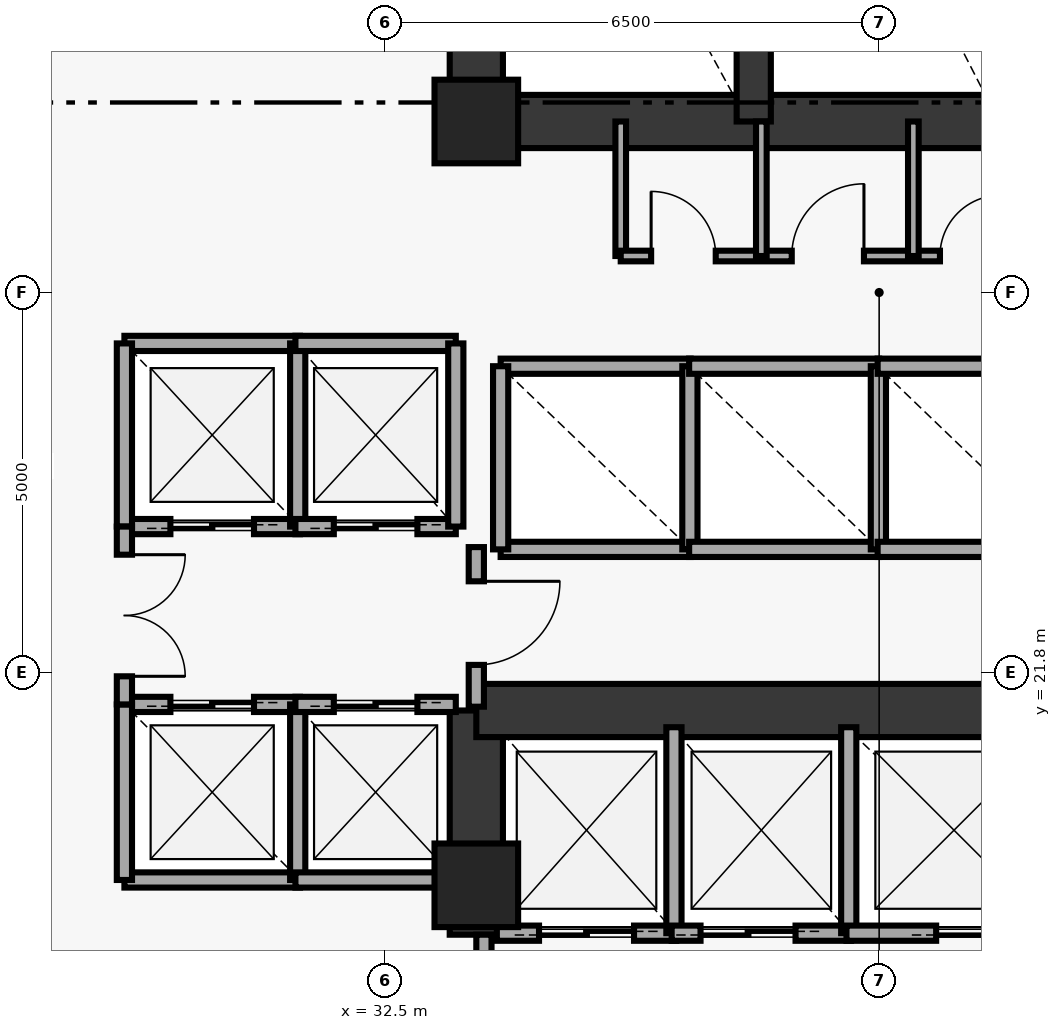
"""IFC4 building model, lengths in metres.
Left out: names, types, materials, properties, quantities, classifications, styles, units other than length and angle.
Written with IfcOpenShell. Run it as: python <this file> out.ifc"""

import sys

from ifc_helpers import new_model, si_unit, direction, frame, frame_2d, origin, origin_2d, place, context, subcontext, project, spatial, rectangle, extrude, element, fill, save


model = new_model("IFC4")
c1 = context("Model", 3, precision=1e-05, world=origin(), true_north=direction((0.0, 1.0)))
c2 = subcontext(c1, "Body", "Model", "MODEL_VIEW")
j1 = project(units=[si_unit("LENGTHUNIT", "METRE"), si_unit("PLANEANGLEUNIT", "RADIAN")], contexts=[c1])
p1 = place(None, origin())
s1 = spatial("IfcSite", under=j1, at=p1, CompositionType="ELEMENT")
p2 = place(p1, origin())
s2 = spatial("IfcBuilding", under=s1, at=p2, CompositionType="ELEMENT")
p3 = place(p2, frame((0.0, 0.0, 102.0)))
s3 = spatial("IfcBuildingStorey", under=s2, at=p3, CompositionType="ELEMENT", Elevation=102.0)
for number, where, z_axis, x_axis in (
    (1, (33.7, 19.0, 0.0), (0.0, 0.0, 1.0), (1.0, 0.0, 0.0)),
    (2, (33.7, 29.05, 0.0), (0.0, 0.0, 1.0), (1.0, 0.0, 0.0)),
):
    element("IfcColumn", number, at=place(p3, frame(where, z_axis=z_axis, x_axis=x_axis)), inside=s3, PredefinedType="PILASTER", context=c2, shape_type="SweptSolid", body=[
        extrude(rectangle(XDim=1.1, YDim=1.1, at=origin_2d()), origin(), (0.0, 0.0, 1.0), 3.7),
    ])
p4 = place(p3, frame((33.7, 29.05, 0.0), z_axis=(0.0, 0.0, 1.0), x_axis=(0.0, 1.0, 0.0)))
e3 = element("IfcWall", 3, at=p4, inside=s3, PredefinedType="SHEAR", context=c2, shape_type="SweptSolid", body=[
    extrude(rectangle(XDim=8.35, YDim=0.7, at=frame_2d((4.175, 0.0))), origin(), (0.0, 0.0, 1.0), 3.7),
])
p5 = place(p3, frame((33.7, 18.35, 0.0), z_axis=(0.0, 0.0, 1.0), x_axis=(0.0, 1.0, 0.0)))
e4 = element("IfcWall", 4, at=p5, inside=s3, PredefinedType="SHEAR", context=c2, shape_type="SweptSolid", body=[
    extrude(rectangle(XDim=2.95, YDim=0.7, at=frame_2d((1.475, 0.0))), origin(), (0.0, 0.0, 1.0), 3.7),
])
p6 = place(p3, frame((33.7, 29.05, 0.0), z_axis=(0.0, 0.0, 1.0), x_axis=(1.0, 0.0, 0.0)))
e5 = element("IfcWall", 5, at=p6, inside=s3, PredefinedType="SHEAR", context=c2, shape_type="SweptSolid", body=[
    extrude(rectangle(XDim=10.6, YDim=0.7, at=frame_2d((5.3, 0.0))), origin(), (0.0, 0.0, 1.0), 3.7),
])
p7 = place(p3, frame((33.7, 21.3, 0.0), z_axis=(0.0, 0.0, 1.0), x_axis=(1.0, 0.0, 0.0)))
e6 = element("IfcWall", 6, at=p7, inside=s3, PredefinedType="SHEAR", context=c2, shape_type="SweptSolid", body=[
    extrude(rectangle(XDim=7.55, YDim=0.7, at=frame_2d((3.775, 0.0))), origin(), (0.0, 0.0, 1.0), 3.7),
])
p8 = place(p3, frame((37.35, 29.05, 0.0), z_axis=(0.0, 0.0, 1.0), x_axis=(0.0, 1.0, 0.0)))
e7 = element("IfcWall", 7, at=p8, inside=s3, PredefinedType="SHEAR", context=c2, shape_type="SweptSolid", body=[
    extrude(rectangle(XDim=8.35, YDim=0.45, at=frame_2d((4.175, 0.0))), origin(), (0.0, 0.0, 1.0), 3.7),
])
p9 = place(p3, frame((35.6, 27.28, 0.0), z_axis=(0.0, 0.0, 1.0), x_axis=(0.0, 1.0, 0.0)))
e8 = element("IfcWall", 8, at=p9, inside=s3, PredefinedType="PARTITIONING", context=c2, shape_type="SweptSolid", body=[
    extrude(rectangle(XDim=1.77, YDim=0.14, at=frame_2d((0.885, 0.0))), origin(), (0.0, 0.0, 1.0), 3.7),
])
p10 = place(p3, frame((29.07, 23.72, 0.0), z_axis=(0.0, 0.0, 1.0), x_axis=(1.0, 0.0, 0.0)))
e9 = element("IfcWall", 9, at=p10, inside=s3, PredefinedType="SOLIDWALL", context=c2, shape_type="SweptSolid", body=[
    extrude(rectangle(XDim=2.31, YDim=0.2, at=frame_2d((1.155, 0.0))), origin(), (0.0, 0.0, 1.0), 3.7),
])
p11 = place(p10, frame((0.605, 0.0, 0.0)))
e10 = element("IfcOpeningElement", 10, at=p11, cuts=e9, PredefinedType="OPENING", context=c2, shape_type="SweptSolid", body=[
    extrude(rectangle(XDim=1.1, YDim=2.15, at=frame_2d((0.55, 1.075))), frame((0.0, 0.11, 0.0), z_axis=(0.0, -1.0, 0.0), x_axis=(1.0, 0.0, 0.0)), (0.0, 0.0, 1.0), 0.22),
])
p12 = place(p3, frame((29.07, 26.13, 0.0), z_axis=(0.0, 0.0, 1.0), x_axis=(1.0, 0.0, 0.0)))
e11 = element("IfcWall", 11, at=p12, inside=s3, PredefinedType="SOLIDWALL", context=c2, shape_type="SweptSolid", body=[
    extrude(rectangle(XDim=2.31, YDim=0.2, at=frame_2d((1.155, 0.0))), origin(), (0.0, 0.0, 1.0), 3.7),
])
for number, where, z_axis, x_axis in (
    (12, (29.07, 23.72, 0.0), (0.0, 0.0, 1.0), (0.0, 1.0, 0.0)),
    (13, (31.35, 23.72, 0.0), (0.0, 0.0, 1.0), (0.0, 1.0, 0.0)),
):
    element("IfcWall", number, at=place(p3, frame(where, z_axis=z_axis, x_axis=x_axis)), inside=s3, PredefinedType="SOLIDWALL", context=c2, shape_type="SweptSolid", body=[
        extrude(rectangle(XDim=2.41, YDim=0.2, at=frame_2d((1.205, 0.0))), origin(), (0.0, 0.0, 1.0), 3.7),
    ])
p13 = place(p3, frame((31.32, 23.72, 0.0), z_axis=(0.0, 0.0, 1.0), x_axis=(1.0, 0.0, 0.0)))
e14 = element("IfcWall", 14, at=p13, inside=s3, PredefinedType="SOLIDWALL", context=c2, shape_type="SweptSolid", body=[
    extrude(rectangle(XDim=2.11, YDim=0.2, at=frame_2d((1.055, 0.0))), origin(), (0.0, 0.0, 1.0), 3.7),
])
p14 = place(p13, frame((0.505, 0.0, 0.0)))
e15 = element("IfcOpeningElement", 15, at=p14, cuts=e14, PredefinedType="OPENING", context=c2, shape_type="SweptSolid", body=[
    extrude(rectangle(XDim=1.1, YDim=2.15, at=frame_2d((0.55, 1.075))), frame((0.0, 0.11, 0.0), z_axis=(0.0, -1.0, 0.0), x_axis=(1.0, 0.0, 0.0)), (0.0, 0.0, 1.0), 0.22),
])
p15 = place(p3, frame((31.32, 26.13, 0.0), z_axis=(0.0, 0.0, 1.0), x_axis=(1.0, 0.0, 0.0)))
e16 = element("IfcWall", 16, at=p15, inside=s3, PredefinedType="SOLIDWALL", context=c2, shape_type="SweptSolid", body=[
    extrude(rectangle(XDim=2.11, YDim=0.2, at=frame_2d((1.055, 0.0))), origin(), (0.0, 0.0, 1.0), 3.7),
])
p16 = place(p3, frame((33.43, 23.72, 0.0), z_axis=(0.0, 0.0, 1.0), x_axis=(0.0, 1.0, 0.0)))
e17 = element("IfcWall", 17, at=p16, inside=s3, PredefinedType="SOLIDWALL", context=c2, shape_type="SweptSolid", body=[
    extrude(rectangle(XDim=2.41, YDim=0.2, at=frame_2d((1.205, 0.0))), origin(), (0.0, 0.0, 1.0), 3.7),
])
p17 = place(p3, frame((29.07, 19.07, 0.0), z_axis=(0.0, 0.0, 1.0), x_axis=(1.0, 0.0, 0.0)))
e18 = element("IfcWall", 18, at=p17, inside=s3, PredefinedType="SOLIDWALL", context=c2, shape_type="SweptSolid", body=[
    extrude(rectangle(XDim=2.31, YDim=0.2, at=frame_2d((1.155, 0.0))), origin(), (0.0, 0.0, 1.0), 3.7),
])
p18 = place(p3, frame((29.07, 21.38, 0.0), z_axis=(0.0, 0.0, 1.0), x_axis=(1.0, 0.0, 0.0)))
e19 = element("IfcWall", 19, at=p18, inside=s3, PredefinedType="SOLIDWALL", context=c2, shape_type="SweptSolid", body=[
    extrude(rectangle(XDim=2.31, YDim=0.2, at=frame_2d((1.155, 0.0))), origin(), (0.0, 0.0, 1.0), 3.7),
])
p19 = place(p18, frame((0.605, 0.0, 0.0)))
e20 = element("IfcOpeningElement", 20, at=p19, cuts=e19, PredefinedType="OPENING", context=c2, shape_type="SweptSolid", body=[
    extrude(rectangle(XDim=1.1, YDim=2.15, at=frame_2d((0.55, 1.075))), frame((0.0, 0.11, 0.0), z_axis=(0.0, -1.0, 0.0), x_axis=(1.0, 0.0, 0.0)), (0.0, 0.0, 1.0), 0.22),
])
for number, where, z_axis, x_axis in (
    (21, (29.07, 19.07, 0.0), (0.0, 0.0, 1.0), (0.0, 1.0, 0.0)),
    (22, (31.35, 19.07, 0.0), (0.0, 0.0, 1.0), (0.0, 1.0, 0.0)),
):
    element("IfcWall", number, at=place(p3, frame(where, z_axis=z_axis, x_axis=x_axis)), inside=s3, PredefinedType="SOLIDWALL", context=c2, shape_type="SweptSolid", body=[
        extrude(rectangle(XDim=2.31, YDim=0.2, at=frame_2d((1.155, 0.0))), origin(), (0.0, 0.0, 1.0), 3.7),
    ])
p20 = place(p3, frame((31.32, 19.07, 0.0), z_axis=(0.0, 0.0, 1.0), x_axis=(1.0, 0.0, 0.0)))
e23 = element("IfcWall", 23, at=p20, inside=s3, PredefinedType="SOLIDWALL", context=c2, shape_type="SweptSolid", body=[
    extrude(rectangle(XDim=2.11, YDim=0.2, at=frame_2d((1.055, 0.0))), origin(), (0.0, 0.0, 1.0), 3.7),
])
p21 = place(p3, frame((31.32, 21.38, 0.0), z_axis=(0.0, 0.0, 1.0), x_axis=(1.0, 0.0, 0.0)))
e24 = element("IfcWall", 24, at=p21, inside=s3, PredefinedType="SOLIDWALL", context=c2, shape_type="SweptSolid", body=[
    extrude(rectangle(XDim=2.11, YDim=0.2, at=frame_2d((1.055, 0.0))), origin(), (0.0, 0.0, 1.0), 3.7),
])
p22 = place(p21, frame((0.505, 0.0, 0.0)))
e25 = element("IfcOpeningElement", 25, at=p22, cuts=e24, PredefinedType="OPENING", context=c2, shape_type="SweptSolid", body=[
    extrude(rectangle(XDim=1.1, YDim=2.15, at=frame_2d((0.55, 1.075))), frame((0.0, 0.11, 0.0), z_axis=(0.0, -1.0, 0.0), x_axis=(1.0, 0.0, 0.0)), (0.0, 0.0, 1.0), 0.22),
])
for number, where, z_axis, x_axis in (
    (26, (34.02, 23.42, 0.0), (0.0, 0.0, 1.0), (1.0, 0.0, 0.0)),
    (27, (34.02, 25.83, 0.0), (0.0, 0.0, 1.0), (1.0, 0.0, 0.0)),
):
    element("IfcWall", number, at=place(p3, frame(where, z_axis=z_axis, x_axis=x_axis)), inside=s3, PredefinedType="SOLIDWALL", context=c2, shape_type="SweptSolid", body=[
        extrude(rectangle(XDim=2.5, YDim=0.2, at=frame_2d((1.25, 0.0))), origin(), (0.0, 0.0, 1.0), 3.7),
    ])
for number, where, z_axis, x_axis in (
    (28, (34.02, 23.42, 0.0), (0.0, 0.0, 1.0), (0.0, 1.0, 0.0)),
    (29, (36.51, 23.42, 0.0), (0.0, 0.0, 1.0), (0.0, 1.0, 0.0)),
):
    element("IfcWall", number, at=place(p3, frame(where, z_axis=z_axis, x_axis=x_axis)), inside=s3, PredefinedType="SOLIDWALL", context=c2, shape_type="SweptSolid", body=[
        extrude(rectangle(XDim=2.41, YDim=0.2, at=frame_2d((1.205, 0.0))), origin(), (0.0, 0.0, 1.0), 3.7),
    ])
for number, where, z_axis, x_axis in (
    (30, (36.5, 23.42, 0.0), (0.0, 0.0, 1.0), (1.0, 0.0, 0.0)),
    (31, (36.5, 25.83, 0.0), (0.0, 0.0, 1.0), (1.0, 0.0, 0.0)),
):
    element("IfcWall", number, at=place(p3, frame(where, z_axis=z_axis, x_axis=x_axis)), inside=s3, PredefinedType="SOLIDWALL", context=c2, shape_type="SweptSolid", body=[
        extrude(rectangle(XDim=2.5, YDim=0.2, at=frame_2d((1.25, 0.0))), origin(), (0.0, 0.0, 1.0), 3.7),
    ])
p23 = place(p3, frame((38.99, 23.42, 0.0), z_axis=(0.0, 0.0, 1.0), x_axis=(0.0, 1.0, 0.0)))
e32 = element("IfcWall", 32, at=p23, inside=s3, PredefinedType="SOLIDWALL", context=c2, shape_type="SweptSolid", body=[
    extrude(rectangle(XDim=2.41, YDim=0.2, at=frame_2d((1.205, 0.0))), origin(), (0.0, 0.0, 1.0), 3.7),
])
for number, where, z_axis, x_axis in (
    (33, (38.98, 23.42, 0.0), (0.0, 0.0, 1.0), (1.0, 0.0, 0.0)),
    (34, (38.98, 25.83, 0.0), (0.0, 0.0, 1.0), (1.0, 0.0, 0.0)),
):
    element("IfcWall", number, at=place(p3, frame(where, z_axis=z_axis, x_axis=x_axis)), inside=s3, PredefinedType="SOLIDWALL", context=c2, shape_type="SweptSolid", body=[
        extrude(rectangle(XDim=2.5, YDim=0.2, at=frame_2d((1.25, 0.0))), origin(), (0.0, 0.0, 1.0), 3.7),
    ])
p24 = place(p3, frame((33.97, 18.37, 0.0), z_axis=(0.0, 0.0, 1.0), x_axis=(1.0, 0.0, 0.0)))
e35 = element("IfcWall", 35, at=p24, inside=s3, PredefinedType="SOLIDWALL", context=c2, shape_type="SweptSolid", body=[
    extrude(rectangle(XDim=2.36, YDim=0.2, at=frame_2d((1.18, 0.0))), origin(), (0.0, 0.0, 1.0), 3.7),
])
p25 = place(p24, frame((0.555, 0.0, 0.0)))
e36 = element("IfcOpeningElement", 36, at=p25, cuts=e35, PredefinedType="OPENING", context=c2, shape_type="SweptSolid", body=[
    extrude(rectangle(XDim=1.25, YDim=2.2, at=frame_2d((0.625, 1.1))), frame((0.0, 0.11, 0.0), z_axis=(0.0, -1.0, 0.0), x_axis=(1.0, 0.0, 0.0)), (0.0, 0.0, 1.0), 0.22),
])
p26 = place(p3, frame((36.3, 18.37, 0.0), z_axis=(0.0, 0.0, 1.0), x_axis=(0.0, 1.0, 0.0)))
e37 = element("IfcWall", 37, at=p26, inside=s3, PredefinedType="SOLIDWALL", context=c2, shape_type="SweptSolid", body=[
    extrude(rectangle(XDim=2.71, YDim=0.2, at=frame_2d((1.355, 0.0))), origin(), (0.0, 0.0, 1.0), 3.7),
])
p27 = place(p3, frame((36.27, 18.37, 0.0), z_axis=(0.0, 0.0, 1.0), x_axis=(1.0, 0.0, 0.0)))
e38 = element("IfcWall", 38, at=p27, inside=s3, PredefinedType="SOLIDWALL", context=c2, shape_type="SweptSolid", body=[
    extrude(rectangle(XDim=2.36, YDim=0.2, at=frame_2d((1.18, 0.0))), origin(), (0.0, 0.0, 1.0), 3.7),
])
p28 = place(p27, frame((0.38, 0.0, 0.0)))
e39 = element("IfcOpeningElement", 39, at=p28, cuts=e38, PredefinedType="OPENING", context=c2, shape_type="SweptSolid", body=[
    extrude(rectangle(XDim=1.25, YDim=2.2, at=frame_2d((0.625, 1.1))), frame((0.0, 0.11, 0.0), z_axis=(0.0, -1.0, 0.0), x_axis=(1.0, 0.0, 0.0)), (0.0, 0.0, 1.0), 0.22),
])
p29 = place(p3, frame((38.6, 18.37, 0.0), z_axis=(0.0, 0.0, 1.0), x_axis=(0.0, 1.0, 0.0)))
e40 = element("IfcWall", 40, at=p29, inside=s3, PredefinedType="SOLIDWALL", context=c2, shape_type="SweptSolid", body=[
    extrude(rectangle(XDim=2.71, YDim=0.2, at=frame_2d((1.355, 0.0))), origin(), (0.0, 0.0, 1.0), 3.7),
])
p30 = place(p3, frame((38.57, 18.37, 0.0), z_axis=(0.0, 0.0, 1.0), x_axis=(1.0, 0.0, 0.0)))
e41 = element("IfcWall", 41, at=p30, inside=s3, PredefinedType="SOLIDWALL", context=c2, shape_type="SweptSolid", body=[
    extrude(rectangle(XDim=2.83, YDim=0.2, at=frame_2d((1.415, 0.0))), origin(), (0.0, 0.0, 1.0), 3.7),
])
p31 = place(p30, frame((1.18, 0.0, 0.0)))
e42 = element("IfcOpeningElement", 42, at=p31, cuts=e41, PredefinedType="OPENING", context=c2, shape_type="SweptSolid", body=[
    extrude(rectangle(XDim=1.35, YDim=2.18, at=frame_2d((0.675, 1.09))), frame((0.0, 0.11, 0.0), z_axis=(0.0, -1.0, 0.0), x_axis=(1.0, 0.0, 0.0)), (0.0, 0.0, 1.0), 0.22),
])
p32 = place(p3, frame((29.07, 21.38, 0.0), z_axis=(0.0, 0.0, 1.0), x_axis=(0.0, 1.0, 0.0)))
e43 = element("IfcWall", 43, at=p32, inside=s3, PredefinedType="SOLIDWALL", context=c2, shape_type="SweptSolid", body=[
    extrude(rectangle(XDim=2.34, YDim=0.2, at=frame_2d((1.17, 0.0))), origin(), (0.0, 0.0, 1.0), 3.7),
])
p33 = place(p32, frame((0.37, 0.0, 0.0)))
e44 = element("IfcOpeningElement", 44, at=p33, cuts=e43, PredefinedType="OPENING", context=c2, shape_type="SweptSolid", body=[
    extrude(rectangle(XDim=1.6, YDim=2.2, at=frame_2d((0.8, 1.1))), frame((0.0, 0.11, 0.0), z_axis=(0.0, -1.0, 0.0), x_axis=(1.0, 0.0, 0.0)), (0.0, 0.0, 1.0), 0.22),
])
p34 = place(p3, frame((33.7, 21.35, 0.0), z_axis=(0.0, 0.0, 1.0), x_axis=(0.0, 1.0, 0.0)))
e45 = element("IfcWall", 45, at=p34, inside=s3, PredefinedType="SOLIDWALL", context=c2, shape_type="SweptSolid", body=[
    extrude(rectangle(XDim=2.1, YDim=0.2, at=frame_2d((1.05, 0.0))), origin(), (0.0, 0.0, 1.0), 2.92),
])
p35 = place(p34, frame((0.55, 0.0, 0.0)))
e46 = element("IfcOpeningElement", 46, at=p35, cuts=e45, PredefinedType="OPENING", context=c2, shape_type="SweptSolid", body=[
    extrude(rectangle(XDim=1.1, YDim=2.15, at=frame_2d((0.55, 1.075))), frame((0.0, 0.11, 0.0), z_axis=(0.0, -1.0, 0.0), x_axis=(1.0, 0.0, 0.0)), (0.0, 0.0, 1.0), 0.22),
])
p36 = place(p3, frame((33.8, 15.55, 0.0), z_axis=(0.0, 0.0, 1.0), x_axis=(0.0, 1.0, 0.0)))
e47 = element("IfcWall", 47, at=p36, inside=s3, PredefinedType="SOLIDWALL", context=c2, shape_type="SweptSolid", body=[
    extrude(rectangle(XDim=2.8, YDim=0.2, at=frame_2d((1.4, 0.0))), origin(), (0.0, 0.0, 1.0), 3.7),
])
p37 = place(p3, frame((35.6, 27.28, 0.0), z_axis=(0.0, 0.0, 1.0), x_axis=(1.0, 0.0, 0.0)))
e48 = element("IfcWall", 48, at=p37, inside=s3, PredefinedType="PARTITIONING", context=c2, shape_type="SweptSolid", body=[
    extrude(rectangle(XDim=5.4, YDim=0.14, at=frame_2d((2.7, 0.0))), origin(), (0.0, 0.0, 1.0), 3.7),
])
p38 = place(p37, frame((0.4, 0.0, 0.0)))
e49 = element("IfcOpeningElement", 49, at=p38, cuts=e48, PredefinedType="OPENING", context=c2, shape_type="SweptSolid", body=[
    extrude(rectangle(XDim=0.85, YDim=2.1, at=frame_2d((0.425, 1.05))), frame((0.0, 0.08, 0.0), z_axis=(0.0, -1.0, 0.0), x_axis=(1.0, 0.0, 0.0)), (0.0, 0.0, 1.0), 0.16),
])
p39 = place(p37, frame((2.25, 0.0, 0.0)))
e50 = element("IfcOpeningElement", 50, at=p39, cuts=e48, PredefinedType="OPENING", context=c2, shape_type="SweptSolid", body=[
    extrude(rectangle(XDim=0.95, YDim=2.1, at=frame_2d((0.475, 1.05))), frame((0.0, 0.08, 0.0), z_axis=(0.0, -1.0, 0.0), x_axis=(1.0, 0.0, 0.0)), (0.0, 0.0, 1.0), 0.16),
])
p40 = place(p37, frame((4.2, 0.0, 0.0)))
e51 = element("IfcOpeningElement", 51, at=p40, cuts=e48, PredefinedType="OPENING", context=c2, shape_type="SweptSolid", body=[
    extrude(rectangle(XDim=0.8, YDim=2.05, at=frame_2d((0.4, 1.025))), frame((0.0, 0.08, 0.0), z_axis=(0.0, -1.0, 0.0), x_axis=(1.0, 0.0, 0.0)), (0.0, 0.0, 1.0), 0.16),
])
for number, where, z_axis, x_axis in (
    (52, (37.45, 27.28, 0.0), (0.0, 0.0, 1.0), (0.0, 1.0, 0.0)),
    (53, (39.45, 27.28, 0.0), (0.0, 0.0, 1.0), (0.0, 1.0, 0.0)),
):
    element("IfcWall", number, at=place(p3, frame(where, z_axis=z_axis, x_axis=x_axis)), inside=s3, PredefinedType="PARTITIONING", context=c2, shape_type="SweptSolid", body=[
        extrude(rectangle(XDim=1.77, YDim=0.14, at=frame_2d((0.885, 0.0))), origin(), (0.0, 0.0, 1.0), 3.7),
    ])
p41 = place(p3, frame((28.492, 14.822, 0.0), z_axis=(0.0, 0.0, 1.0), x_axis=(-0.558319056182, 0.829626320402, 0.0)))
e54 = element("IfcWall", 54, at=p41, inside=s3, PredefinedType="PARTITIONING", context=c2, shape_type="SweptSolid", body=[
    extrude(rectangle(XDim=4.229, YDim=0.16, at=frame_2d((2.114, 0.0))), origin(), (0.0, 0.0, 1.0), 3.7),
])
p42 = place(p41, frame((1.639, 0.0, 0.0)))
e55 = element("IfcOpeningElement", 55, at=p42, cuts=e54, PredefinedType="OPENING", context=c2, shape_type="SweptSolid", body=[
    extrude(rectangle(XDim=0.95, YDim=2.15, at=frame_2d((0.475, 1.075))), frame((0.0, 0.09, 0.0), z_axis=(0.0, -1.0, 0.0), x_axis=(1.0, 0.0, 0.0)), (0.0, 0.0, 1.0), 0.18),
])
p43 = place(p11, origin())
e56 = element("IfcDoor", 56, at=p43, inside=s3, OperationType="DOUBLE_DOOR_SLIDING", PredefinedType="DOOR", context=c2, shape_type="SweptSolid", body=[
    extrude(rectangle(XDim=1.1, YDim=2.15, at=frame_2d((0.55, 1.075))), frame((0.0, 0.025, 0.0), z_axis=(0.0, -1.0, 0.0), x_axis=(1.0, 0.0, 0.0)), (0.0, 0.0, 1.0), 0.05),
])
fill(e10, e56)
p44 = place(p14, origin())
e57 = element("IfcDoor", 57, at=p44, inside=s3, OperationType="DOUBLE_DOOR_SLIDING", PredefinedType="DOOR", context=c2, shape_type="SweptSolid", body=[
    extrude(rectangle(XDim=1.1, YDim=2.15, at=frame_2d((0.55, 1.075))), frame((0.0, 0.025, 0.0), z_axis=(0.0, -1.0, 0.0), x_axis=(1.0, 0.0, 0.0)), (0.0, 0.0, 1.0), 0.05),
])
fill(e15, e57)
p45 = place(p19, origin())
e58 = element("IfcDoor", 58, at=p45, inside=s3, OperationType="DOUBLE_DOOR_SLIDING", PredefinedType="DOOR", context=c2, shape_type="SweptSolid", body=[
    extrude(rectangle(XDim=1.1, YDim=2.15, at=frame_2d((0.55, 1.075))), frame((0.0, 0.025, 0.0), z_axis=(0.0, -1.0, 0.0), x_axis=(1.0, 0.0, 0.0)), (0.0, 0.0, 1.0), 0.05),
])
fill(e20, e58)
p46 = place(p22, origin())
e59 = element("IfcDoor", 59, at=p46, inside=s3, OperationType="DOUBLE_DOOR_SLIDING", PredefinedType="DOOR", context=c2, shape_type="SweptSolid", body=[
    extrude(rectangle(XDim=1.1, YDim=2.15, at=frame_2d((0.55, 1.075))), frame((0.0, 0.025, 0.0), z_axis=(0.0, -1.0, 0.0), x_axis=(1.0, 0.0, 0.0)), (0.0, 0.0, 1.0), 0.05),
])
fill(e25, e59)
p47 = place(p25, origin())
e60 = element("IfcDoor", 60, at=p47, inside=s3, OperationType="DOUBLE_DOOR_SLIDING", PredefinedType="DOOR", context=c2, shape_type="SweptSolid", body=[
    extrude(rectangle(XDim=1.25, YDim=2.2, at=frame_2d((0.625, 1.1))), frame((0.0, 0.025, 0.0), z_axis=(0.0, -1.0, 0.0), x_axis=(1.0, 0.0, 0.0)), (0.0, 0.0, 1.0), 0.05),
])
fill(e36, e60)
p48 = place(p28, origin())
e61 = element("IfcDoor", 61, at=p48, inside=s3, OperationType="DOUBLE_DOOR_SLIDING", PredefinedType="DOOR", context=c2, shape_type="SweptSolid", body=[
    extrude(rectangle(XDim=1.25, YDim=2.2, at=frame_2d((0.625, 1.1))), frame((0.0, 0.025, 0.0), z_axis=(0.0, -1.0, 0.0), x_axis=(1.0, 0.0, 0.0)), (0.0, 0.0, 1.0), 0.05),
])
fill(e39, e61)
p49 = place(p31, origin())
e62 = element("IfcDoor", 62, at=p49, inside=s3, OperationType="DOUBLE_DOOR_SLIDING", PredefinedType="DOOR", context=c2, shape_type="SweptSolid", body=[
    extrude(rectangle(XDim=1.35, YDim=2.18, at=frame_2d((0.675, 1.09))), frame((0.0, 0.025, 0.0), z_axis=(0.0, -1.0, 0.0), x_axis=(1.0, 0.0, 0.0)), (0.0, 0.0, 1.0), 0.05),
])
fill(e42, e62)
p50 = place(p33, origin())
e63 = element("IfcDoor", 63, at=p50, inside=s3, OperationType="DOUBLE_DOOR_SINGLE_SWING", PredefinedType="DOOR", context=c2, shape_type="SweptSolid", body=[
    extrude(rectangle(XDim=1.6, YDim=2.2, at=frame_2d((0.8, 1.1))), frame((0.0, 0.025, 0.0), z_axis=(0.0, -1.0, 0.0), x_axis=(1.0, 0.0, 0.0)), (0.0, 0.0, 1.0), 0.05),
])
fill(e44, e63)
p51 = place(p35, origin())
e64 = element("IfcDoor", 64, at=p51, inside=s3, OperationType="SINGLE_SWING_RIGHT", PredefinedType="DOOR", context=c2, shape_type="SweptSolid", body=[
    extrude(rectangle(XDim=1.1, YDim=2.15, at=frame_2d((0.55, 1.075))), frame((0.0, 0.025, 0.0), z_axis=(0.0, -1.0, 0.0), x_axis=(1.0, 0.0, 0.0)), (0.0, 0.0, 1.0), 0.05),
])
fill(e46, e64)
p52 = place(p38, origin())
e65 = element("IfcDoor", 65, at=p52, inside=s3, OperationType="SINGLE_SWING_LEFT", PredefinedType="DOOR", context=c2, shape_type="SweptSolid", body=[
    extrude(rectangle(XDim=0.85, YDim=2.1, at=frame_2d((0.425, 1.05))), frame((0.0, 0.025, 0.0), z_axis=(0.0, -1.0, 0.0), x_axis=(1.0, 0.0, 0.0)), (0.0, 0.0, 1.0), 0.05),
])
fill(e49, e65)
p53 = place(p39, origin())
e66 = element("IfcDoor", 66, at=p53, inside=s3, OperationType="SINGLE_SWING_RIGHT", PredefinedType="DOOR", context=c2, shape_type="SweptSolid", body=[
    extrude(rectangle(XDim=0.95, YDim=2.1, at=frame_2d((0.475, 1.05))), frame((0.0, 0.025, 0.0), z_axis=(0.0, -1.0, 0.0), x_axis=(1.0, 0.0, 0.0)), (0.0, 0.0, 1.0), 0.05),
])
fill(e50, e66)
p54 = place(p40, origin())
e67 = element("IfcDoor", 67, at=p54, inside=s3, OperationType="SINGLE_SWING_RIGHT", PredefinedType="DOOR", context=c2, shape_type="SweptSolid", body=[
    extrude(rectangle(XDim=0.8, YDim=2.05, at=frame_2d((0.4, 1.025))), frame((0.0, 0.025, 0.0), z_axis=(0.0, -1.0, 0.0), x_axis=(1.0, 0.0, 0.0)), (0.0, 0.0, 1.0), 0.05),
])
fill(e51, e67)
save(model, sys.argv[1])
